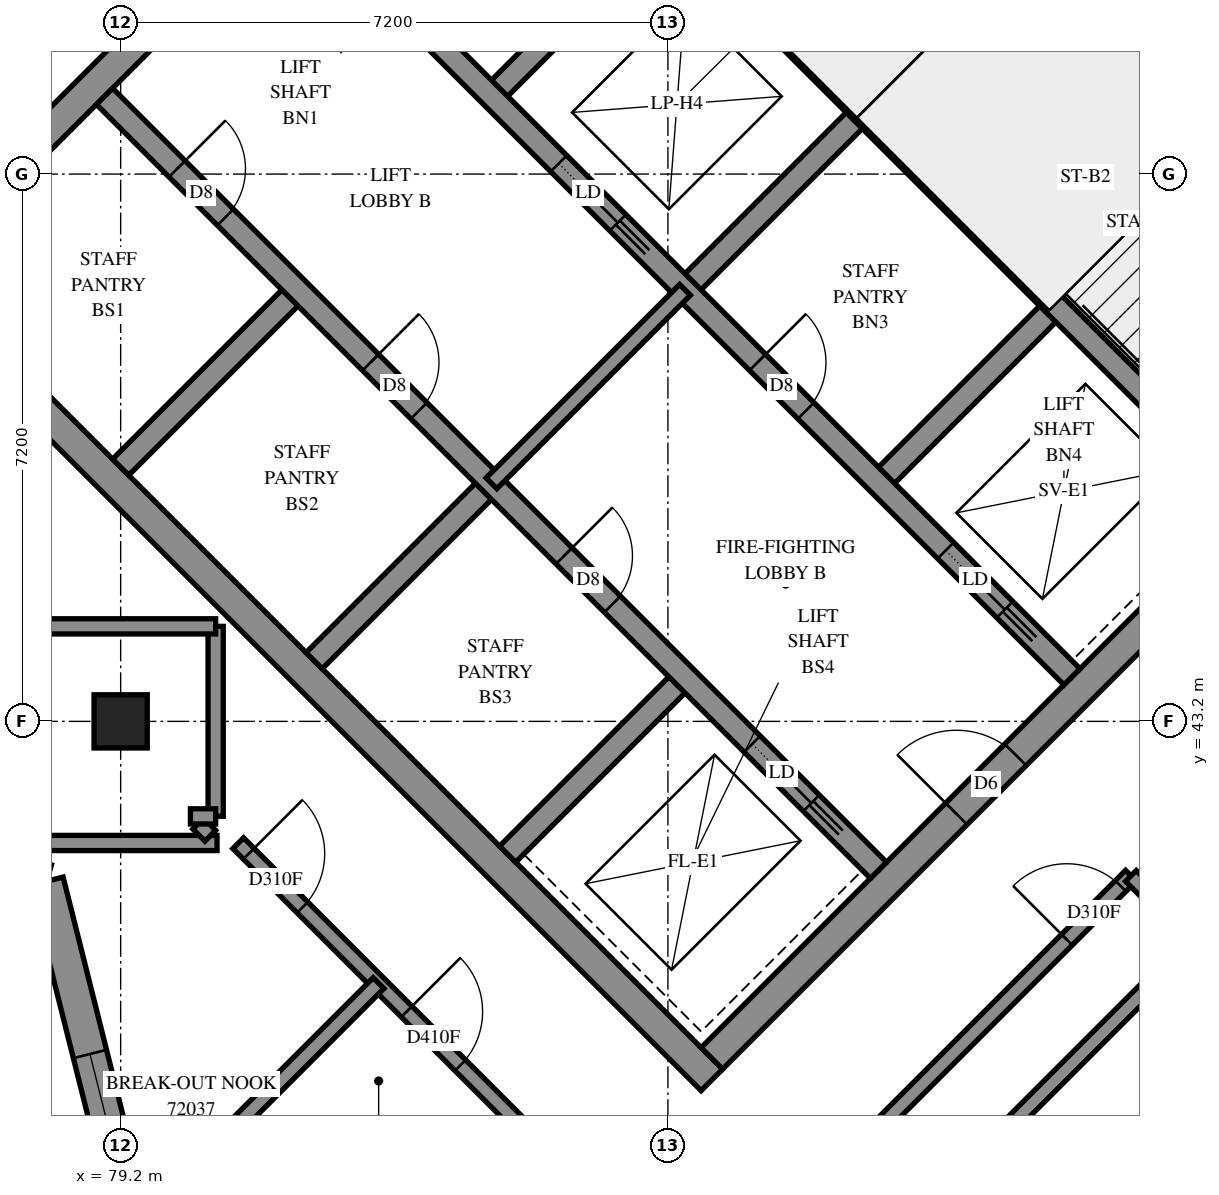
"""IFC4 building model, lengths in metres.
Left out: names, types, materials, properties, quantities, classifications, styles, units other than length and angle.
Written with IfcOpenShell. Run it as: python <this file> out.ifc"""

import sys

from ifc_helpers import new_model, si_unit, direction, frame, frame_2d, origin, origin_2d, place, context, subcontext, project, spatial, polyline, rectangle, outline, extrude, element, fill, save


model = new_model("IFC4")
c1 = context("Model", 3, precision=1e-05, world=origin(), true_north=direction((0.0, 1.0)))
c2 = subcontext(c1, "Body", "Model", "MODEL_VIEW")
j1 = project(units=[si_unit("LENGTHUNIT", "METRE"), si_unit("PLANEANGLEUNIT", "RADIAN")], contexts=[c1])
p1 = place(None, origin())
s1 = spatial("IfcSite", under=j1, at=p1, CompositionType="ELEMENT")
p2 = place(p1, origin())
s2 = spatial("IfcBuilding", under=s1, at=p2, CompositionType="ELEMENT")
p3 = place(p2, frame((0.0, 0.0, 264.2)))
s3 = spatial("IfcBuildingStorey", under=s2, at=p3, CompositionType="ELEMENT", Elevation=264.2)
p4 = place(p3, frame((79.2, 43.2, 0.0), z_axis=(0.0, 0.0, 1.0), x_axis=(1.0, 0.0, 0.0)))
e1 = element("IfcColumn", 1, at=p4, inside=s3, PredefinedType="COLUMN", context=c2, shape_type="SweptSolid", body=[
    extrude(rectangle(XDim=0.7, YDim=0.7, at=origin_2d()), origin(), (0.0, 0.0, 1.0), 3.1),
])
p5 = place(p3, frame((76.23, 49.231, -0.3), z_axis=(0.0, 0.0, 1.0), x_axis=(0.7071034917, -0.7071100706, 0.0)))
e2 = element("IfcWall", 2, at=p5, inside=s3, PredefinedType="SHEAR", context=c2, shape_type="SweptSolid", body=[
    extrude(rectangle(XDim=15.2, YDim=0.4, at=frame_2d((7.6, 0.0))), origin(), (0.0, 0.0, 1.0), 2.7),
])
p6 = place(p3, frame((86.695, 59.696, -0.3), z_axis=(0.0, 0.0, 1.0), x_axis=(0.7071100706, -0.7071034917, 0.0)))
e3 = element("IfcWall", 3, at=p6, inside=s3, PredefinedType="SHEAR", context=c2, shape_type="SweptSolid", body=[
    extrude(rectangle(XDim=15.2, YDim=0.4, at=frame_2d((7.6, 0.0))), origin(), (0.0, 0.0, 1.0), 2.7),
])
p7 = place(p6, frame((10.4, 0.0, 0.3)))
e4 = element("IfcOpeningElement", 4, at=p7, cuts=e3, PredefinedType="OPENING", context=c2, shape_type="SweptSolid", body=[
    extrude(rectangle(XDim=0.8, YDim=2.1, at=frame_2d((0.4, 1.05))), frame((0.0, 0.21, 0.0), z_axis=(0.0, -1.0, 0.0), x_axis=(1.0, 0.0, 0.0)), (0.0, 0.0, 1.0), 0.42),
])
p8 = place(p3, frame((76.513, 49.231, -0.3), z_axis=(0.0, 0.0, 1.0), x_axis=(0.7071067812, 0.7071067812, 0.0)))
e5 = element("IfcWall", 5, at=p8, inside=s3, PredefinedType="SHEAR", context=c2, shape_type="SweptSolid", body=[
    extrude(rectangle(XDim=14.4, YDim=0.4, at=frame_2d((7.2, 0.0))), origin(), (0.0, 0.0, 1.0), 2.7),
])
p9 = place(p8, frame((4.55, 0.0, 0.3)))
e6 = element("IfcOpeningElement", 6, at=p9, cuts=e5, PredefinedType="OPENING", context=c2, shape_type="SweptSolid", body=[
    extrude(rectangle(XDim=1.1, YDim=2.1, at=frame_2d((0.55, 1.05))), frame((0.0, 0.21, 0.0), z_axis=(0.0, -1.0, 0.0), x_axis=(1.0, 0.0, 0.0)), (0.0, 0.0, 1.0), 0.42),
])
p10 = place(p8, frame((11.35, 0.0, 0.3)))
e7 = element("IfcOpeningElement", 7, at=p10, cuts=e5, PredefinedType="OPENING", context=c2, shape_type="SweptSolid", body=[
    extrude(rectangle(XDim=1.1, YDim=2.1, at=frame_2d((0.55, 1.05))), frame((0.0, 0.21, 0.0), z_axis=(0.0, -1.0, 0.0), x_axis=(1.0, 0.0, 0.0)), (0.0, 0.0, 1.0), 0.42),
])
p11 = place(p3, frame((86.978, 38.766, -0.3), z_axis=(0.0, 0.0, 1.0), x_axis=(0.7071067812, 0.7071067812, 0.0)))
e8 = element("IfcWall", 8, at=p11, inside=s3, PredefinedType="SHEAR", context=c2, shape_type="SweptSolid", body=[
    extrude(rectangle(XDim=14.4, YDim=0.4, at=frame_2d((7.2, 0.0))), origin(), (0.0, 0.0, 1.0), 2.7),
])
p12 = place(p11, frame((4.55, 0.0, 0.3)))
e9 = element("IfcOpeningElement", 9, at=p12, cuts=e8, PredefinedType="OPENING", context=c2, shape_type="SweptSolid", body=[
    extrude(rectangle(XDim=1.1, YDim=2.1, at=frame_2d((0.55, 1.05))), frame((0.0, 0.21, 0.0), z_axis=(0.0, -1.0, 0.0), x_axis=(1.0, 0.0, 0.0)), (0.0, 0.0, 1.0), 0.42),
])
p13 = place(p11, frame((11.35, 0.0, 0.3)))
e10 = element("IfcOpeningElement", 10, at=p13, cuts=e8, PredefinedType="OPENING", context=c2, shape_type="SweptSolid", body=[
    extrude(rectangle(XDim=1.1, YDim=2.1, at=frame_2d((0.55, 1.05))), frame((0.0, 0.21, 0.0), z_axis=(0.0, -1.0, 0.0), x_axis=(1.0, 0.0, 0.0)), (0.0, 0.0, 1.0), 0.42),
])
for number, where, z_axis, x_axis in (
    (11, (79.2, 46.544, 0.0), (0.0, 0.0, 1.0), (0.707, 0.707, 0.0)),
    (12, (84.079, 51.423, 0.0), (0.0, 0.0, 1.0), (0.707, 0.707, 0.0)),
):
    element("IfcWall", number, at=place(p3, frame(where, z_axis=z_axis, x_axis=x_axis)), inside=s3, PredefinedType="SOLIDWALL", context=c2, shape_type="SweptSolid", body=[
        extrude(rectangle(XDim=3.3, YDim=0.3, at=frame_2d((1.65, 0.0))), origin(), (0.0, 0.0, 1.0), 3.1),
    ])
p14 = place(p3, frame((81.746, 43.999, 0.0), z_axis=(0.0, 0.0, 1.0), x_axis=(0.7071067812, 0.7071067812, 0.0)))
e13 = element("IfcWall", 13, at=p14, inside=s3, PredefinedType="SOLIDWALL", context=c2, shape_type="SweptSolid", body=[
    extrude(rectangle(XDim=3.3, YDim=0.3, at=frame_2d((1.65, 0.0))), origin(), (0.0, 0.0, 1.0), 3.1),
])
p15 = place(p3, frame((86.625, 48.878, 0.0), z_axis=(0.0, 0.0, 1.0), x_axis=(0.7071067812, 0.7071067812, 0.0)))
e14 = element("IfcWall", 14, at=p15, inside=s3, PredefinedType="SOLIDWALL", context=c2, shape_type="SweptSolid", body=[
    extrude(rectangle(XDim=3.3, YDim=0.3, at=frame_2d((1.65, 0.0))), origin(), (0.0, 0.0, 1.0), 3.1),
])
p16 = place(p3, frame((84.291, 41.453, 0.0), z_axis=(0.0, 0.0, 1.0), x_axis=(0.7071067812, 0.7071067812, 0.0)))
e15 = element("IfcWall", 15, at=p16, inside=s3, PredefinedType="SOLIDWALL", context=c2, shape_type="SweptSolid", body=[
    extrude(rectangle(XDim=3.3, YDim=0.3, at=frame_2d((1.65, 0.0))), origin(), (0.0, 0.0, 1.0), 3.1),
])
p17 = place(p3, frame((89.17, 46.332, 0.0), z_axis=(0.0, 0.0, 1.0), x_axis=(0.7071067812, 0.7071067812, 0.0)))
e16 = element("IfcWall", 16, at=p17, inside=s3, PredefinedType="SOLIDWALL", context=c2, shape_type="SweptSolid", body=[
    extrude(rectangle(XDim=3.3, YDim=0.3, at=frame_2d((1.65, 0.0))), origin(), (0.0, 0.0, 1.0), 3.1),
])
p18 = place(p3, frame((78.988, 51.423, 0.0), z_axis=(0.0, 0.0, 1.0), x_axis=(0.7071067812, -0.7071067812, 0.0)))
e17 = element("IfcWall", 17, at=p18, inside=s3, PredefinedType="SOLIDWALL", context=c2, shape_type="SweptSolid", body=[
    extrude(rectangle(XDim=14.4, YDim=0.3, at=frame_2d((7.2, 0.0))), origin(), (0.0, 0.0, 1.0), 3.1),
])
p19 = place(p18, frame((1.35, 0.0, 0.0)))
e18 = element("IfcOpeningElement", 18, at=p19, cuts=e17, PredefinedType="OPENING", context=c2, shape_type="SweptSolid", body=[
    extrude(rectangle(XDim=0.9, YDim=2.1, at=frame_2d((0.45, 1.05))), frame((0.0, 0.16, 0.0), z_axis=(0.0, -1.0, 0.0), x_axis=(1.0, 0.0, 0.0)), (0.0, 0.0, 1.0), 0.32),
])
p20 = place(p18, frame((4.95, 0.0, 0.0)))
e19 = element("IfcOpeningElement", 19, at=p20, cuts=e17, PredefinedType="OPENING", context=c2, shape_type="SweptSolid", body=[
    extrude(rectangle(XDim=0.9, YDim=2.1, at=frame_2d((0.45, 1.05))), frame((0.0, 0.16, 0.0), z_axis=(0.0, -1.0, 0.0), x_axis=(1.0, 0.0, 0.0)), (0.0, 0.0, 1.0), 0.32),
])
p21 = place(p18, frame((8.55, 0.0, 0.0)))
e20 = element("IfcOpeningElement", 20, at=p21, cuts=e17, PredefinedType="OPENING", context=c2, shape_type="SweptSolid", body=[
    extrude(rectangle(XDim=0.9, YDim=2.1, at=frame_2d((0.45, 1.05))), frame((0.0, 0.16, 0.0), z_axis=(0.0, -1.0, 0.0), x_axis=(1.0, 0.0, 0.0)), (0.0, 0.0, 1.0), 0.32),
])
p22 = place(p18, frame((12.05, 0.0, 0.0)))
e21 = element("IfcOpeningElement", 21, at=p22, cuts=e17, PredefinedType="OPENING", context=c2, shape_type="SweptSolid", body=[
    extrude(rectangle(XDim=1.1, YDim=2.1, at=frame_2d((0.55, 1.05))), frame((0.0, 0.16, 0.0), z_axis=(0.0, -1.0, 0.0), x_axis=(1.0, 0.0, 0.0)), (0.0, 0.0, 1.0), 0.32),
])
p23 = place(p3, frame((81.534, 53.969, 0.0), z_axis=(0.0, 0.0, 1.0), x_axis=(0.707103309, -0.7071102534, 0.0)))
e22 = element("IfcWall", 22, at=p23, inside=s3, PredefinedType="SOLIDWALL", context=c2, shape_type="SweptSolid", body=[
    extrude(rectangle(XDim=14.4, YDim=0.3, at=frame_2d((7.2, 0.0))), origin(), (0.0, 0.0, 1.0), 3.1),
])
p24 = place(p23, frame((8.55, 0.0, 0.0)))
e23 = element("IfcOpeningElement", 23, at=p24, cuts=e22, PredefinedType="OPENING", context=c2, shape_type="SweptSolid", body=[
    extrude(rectangle(XDim=0.9, YDim=2.1, at=frame_2d((0.45, 1.05))), frame((0.0, 0.16, 0.0), z_axis=(0.0, -1.0, 0.0), x_axis=(1.0, 0.0, 0.0)), (0.0, 0.0, 1.0), 0.32),
])
p25 = place(p23, frame((1.25, 0.0, 0.0)))
e24 = element("IfcOpeningElement", 24, at=p25, cuts=e22, PredefinedType="OPENING", context=c2, shape_type="SweptSolid", body=[
    extrude(rectangle(XDim=1.1, YDim=2.1, at=frame_2d((0.55, 1.05))), frame((0.0, 0.16, 0.0), z_axis=(0.0, -1.0, 0.0), x_axis=(1.0, 0.0, 0.0)), (0.0, 0.0, 1.0), 0.32),
])
p26 = place(p23, frame((4.85, 0.0, 0.0)))
e25 = element("IfcOpeningElement", 25, at=p26, cuts=e22, PredefinedType="OPENING", context=c2, shape_type="SweptSolid", body=[
    extrude(rectangle(XDim=1.1, YDim=2.1, at=frame_2d((0.55, 1.05))), frame((0.0, 0.16, 0.0), z_axis=(0.0, -1.0, 0.0), x_axis=(1.0, 0.0, 0.0)), (0.0, 0.0, 1.0), 0.32),
])
p27 = place(p23, frame((12.05, 0.0, 0.0)))
e26 = element("IfcOpeningElement", 26, at=p27, cuts=e22, PredefinedType="OPENING", context=c2, shape_type="SweptSolid", body=[
    extrude(rectangle(XDim=1.1, YDim=2.1, at=frame_2d((0.55, 1.05))), frame((0.0, 0.16, 0.0), z_axis=(0.0, -1.0, 0.0), x_axis=(1.0, 0.0, 0.0)), (0.0, 0.0, 1.0), 0.32),
])
for number, where, z_axis, x_axis in (
    (27, (83.867, 56.302, 0.0), (0.0, 0.0, 1.0), (0.707, -0.707, 0.0)),
    (28, (88.958, 51.211, 0.0), (0.0, 0.0, 1.0), (0.707, -0.707, 0.0)),
):
    element("IfcWall", number, at=place(p3, frame(where, z_axis=z_axis, x_axis=x_axis)), inside=s3, PredefinedType="SOLIDWALL", context=c2, shape_type="SweptSolid", body=[
        extrude(rectangle(XDim=7.2, YDim=0.3, at=frame_2d((3.6, 0.0))), origin(), (0.0, 0.0, 1.0), 3.1),
    ])
p28 = place(p3, frame((88.958, 51.211, 0.0), z_axis=(0.0, 0.0, 1.0), x_axis=(0.7071067812, 0.7071067812, 0.0)))
e29 = element("IfcWall", 29, at=p28, inside=s3, PredefinedType="SOLIDWALL", context=c2, shape_type="SweptSolid", body=[
    extrude(rectangle(XDim=4.2, YDim=0.3, at=frame_2d((2.1, 0.0))), origin(), (0.0, 0.0, 1.0), 3.1),
])
p29 = place(p3, frame((74.451, 42.229, 0.0), z_axis=(0.0, 0.0, 1.0), x_axis=(0.957789952, -0.2874689685, 0.0)))
e30 = element("IfcWall", 30, at=p29, inside=s3, PredefinedType="SOLIDWALL", context=c2, shape_type="SweptSolid", body=[
    extrude(outline(polyline([(0.049, -0.225), (3.812, -0.225), (4.068, 0.225), (-0.049, 0.225), (0.049, -0.225)])), origin(), (0.0, 0.0, 1.0), 3.1),
])
p30 = place(p3, frame((78.225, 41.097, 0.0), z_axis=(0.0, 0.0, 1.0), x_axis=(0.2436835103, -0.9698548071, 0.0)))
e31 = element("IfcWall", 31, at=p30, inside=s3, PredefinedType="SOLIDWALL", context=c2, shape_type="SweptSolid", body=[
    extrude(outline(polyline([(0.128, -0.225), (4.802, -0.225), (4.544, 0.225), (-0.128, 0.225), (0.128, -0.225)])), origin(), (0.0, 0.0, 1.0), 3.1),
])
p31 = place(p30, frame((2.344, 0.0, 0.45)))
e32 = element("IfcOpeningElement", 32, at=p31, cuts=e31, PredefinedType="OPENING", context=c2, shape_type="SweptSolid", body=[
    extrude(rectangle(XDim=1.2, YDim=2.55, at=frame_2d((0.6, 1.275))), frame((0.0, 0.235, 0.0), z_axis=(0.0, -1.0, 0.0), x_axis=(1.0, 0.0, 0.0)), (0.0, 0.0, 1.0), 0.47),
])
p32 = place(p3, frame((91.313, 53.354, 0.0), z_axis=(0.0, 0.0, 1.0), x_axis=(0.7071067812, -0.7071067812, 0.0)))
e33 = element("IfcWall", 33, at=p32, inside=s3, PredefinedType="PARTITIONING", context=c2, shape_type="SweptSolid", body=[
    extrude(rectangle(XDim=5.95, YDim=0.15, at=frame_2d((2.975, 0.0))), origin(), (0.0, 0.0, 1.0), 3.1),
])
p33 = place(p3, frame((84.079, 46.332, 0.0), z_axis=(0.0, 0.0, 1.0), x_axis=(0.7071067812, 0.7071067812, 0.0)))
e34 = element("IfcWall", 34, at=p33, inside=s3, PredefinedType="PARTITIONING", context=c2, shape_type="SweptSolid", body=[
    extrude(rectangle(XDim=3.6, YDim=0.2, at=frame_2d((1.8, 0.0))), origin(), (0.0, 0.0, 1.0), 3.1),
])
p34 = place(p3, frame((84.96, 31.941, 0.0), z_axis=(0.0, 0.0, 1.0), x_axis=(0.707102563, 0.7071109994, 0.0)))
e35 = element("IfcWall", 35, at=p34, inside=s3, PredefinedType="PARTITIONING", context=c2, shape_type="SweptSolid", body=[
    extrude(rectangle(XDim=11.853, YDim=0.2, at=frame_2d((5.927, 0.0))), origin(), (0.0, 0.0, 1.0), 3.1),
])
p35 = place(p3, frame((80.747, 41.597, 0.0), z_axis=(0.0, 0.0, 1.0), x_axis=(0.7071067812, -0.7071067812, 0.0)))
e36 = element("IfcWall", 36, at=p35, inside=s3, PredefinedType="PARTITIONING", context=c2, shape_type="SweptSolid", body=[
    extrude(rectangle(XDim=8.607, YDim=0.2, at=frame_2d((4.303, 0.0))), origin(), (0.0, 0.0, 1.0), 3.1),
])
p36 = place(p35, frame((0.195, 0.0, 0.0)))
e37 = element("IfcOpeningElement", 37, at=p36, cuts=e36, PredefinedType="OPENING", context=c2, shape_type="SweptSolid", body=[
    extrude(rectangle(XDim=1.0, YDim=2.1, at=frame_2d((0.5, 1.05))), frame((0.0, 0.11, 0.0), z_axis=(0.0, -1.0, 0.0), x_axis=(1.0, 0.0, 0.0)), (0.0, 0.0, 1.0), 0.22),
])
p37 = place(p35, frame((3.133, 0.0, 0.0)))
e38 = element("IfcOpeningElement", 38, at=p37, cuts=e36, PredefinedType="OPENING", context=c2, shape_type="SweptSolid", body=[
    extrude(rectangle(XDim=1.0, YDim=2.1, at=frame_2d((0.5, 1.05))), frame((0.0, 0.11, 0.0), z_axis=(0.0, -1.0, 0.0), x_axis=(1.0, 0.0, 0.0)), (0.0, 0.0, 1.0), 0.22),
])
p38 = place(p3, frame((86.836, 35.514, 0.0), z_axis=(0.0, 0.0, 1.0), x_axis=(0.7071067812, 0.7071067812, 0.0)))
e39 = element("IfcWall", 39, at=p38, inside=s3, PredefinedType="PARTITIONING", context=c2, shape_type="SweptSolid", body=[
    extrude(rectangle(XDim=7.999, YDim=0.2, at=frame_2d((3.999, 0.0))), origin(), (0.0, 0.0, 1.0), 3.1),
])
p39 = place(p38, frame((6.807, 0.0, 0.0)))
e40 = element("IfcOpeningElement", 40, at=p39, cuts=e39, PredefinedType="OPENING", context=c2, shape_type="SweptSolid", body=[
    extrude(rectangle(XDim=1.0, YDim=2.1, at=frame_2d((0.5, 1.05))), frame((0.0, 0.11, 0.0), z_axis=(0.0, -1.0, 0.0), x_axis=(1.0, 0.0, 0.0)), (0.0, 0.0, 1.0), 0.22),
])
p40 = place(p3, frame((92.491, 41.167, 0.0), z_axis=(0.0, 0.0, 1.0), x_axis=(0.7071067812, -0.7071067812, 0.0)))
e41 = element("IfcWall", 41, at=p40, inside=s3, PredefinedType="PARTITIONING", context=c2, shape_type="SweptSolid", body=[
    extrude(rectangle(XDim=4.8, YDim=0.2, at=frame_2d((2.4, 0.0))), origin(), (0.0, 0.0, 1.0), 3.1),
])
p41 = place(p40, frame((1.725, 0.0, 0.0)))
e42 = element("IfcOpeningElement", 42, at=p41, cuts=e41, PredefinedType="OPENING", context=c2, shape_type="SweptSolid", body=[
    extrude(rectangle(XDim=1.0, YDim=2.1, at=frame_2d((0.5, 1.05))), frame((0.0, 0.11, 0.0), z_axis=(0.0, -1.0, 0.0), x_axis=(1.0, 0.0, 0.0)), (0.0, 0.0, 1.0), 0.22),
])
p42 = place(p3, frame((79.574, 36.738, 0.0), z_axis=(0.0, 0.0, 1.0), x_axis=(0.7071067812, 0.7071067812, 0.0)))
e43 = element("IfcWall", 43, at=p42, inside=s3, PredefinedType="PARTITIONING", context=c2, shape_type="SweptSolid", body=[
    extrude(rectangle(XDim=4.269, YDim=0.2, at=frame_2d((2.135, 0.0))), origin(), (0.0, 0.0, 1.0), 3.1),
])
p43 = place(p3, frame((77.381, 41.6, 0.0), z_axis=(0.0, 0.0, 1.0), x_axis=(1.0, 0.0, 0.0)))
e44 = element("IfcWall", 44, at=p43, inside=s3, PredefinedType="PARTITIONING", context=c2, shape_type="SweptSolid", body=[
    extrude(rectangle(XDim=3.087, YDim=0.2, at=frame_2d((1.543, 0.0))), origin(), (0.0, 0.0, 1.0), 3.1),
])
for number, where, z_axis, x_axis in (
    (45, (80.45, 41.952, 0.0), (0.0, 0.0, 1.0), (0.0, 1.0, 0.0)),
    (46, (77.952, 44.45, 0.0), (0.0, 0.0, 1.0), (1.0, 0.0, 0.0)),
):
    element("IfcWall", number, at=place(p3, frame(where, z_axis=z_axis, x_axis=x_axis)), inside=s3, PredefinedType="PARTITIONING", context=c2, shape_type="SweptSolid", body=[
        extrude(rectangle(XDim=2.498, YDim=0.2, at=frame_2d((1.249, 0.0))), origin(), (0.0, 0.0, 1.0), 3.1),
    ])
p44 = place(p3, frame((80.221, 41.855, 0.0), z_axis=(0.0, 0.0, 1.0), x_axis=(0.7068844555, -0.707329037, 0.0)))
e47 = element("IfcWall", 47, at=p44, inside=s3, PredefinedType="PARTITIONING", context=c2, shape_type="SweptSolid", body=[
    extrude(rectangle(XDim=0.225, YDim=0.2, at=frame_2d((0.112, 0.0))), origin(), (0.0, 0.0, 1.0), 3.1),
])
p45 = place(p3, frame((80.118, 41.95, 0.0), z_axis=(0.0, 0.0, 1.0), x_axis=(1.0, 0.0, 0.0)))
e48 = element("IfcWall", 48, at=p45, inside=s3, PredefinedType="PARTITIONING", context=c2, shape_type="SweptSolid", body=[
    extrude(rectangle(XDim=0.332, YDim=0.2, at=frame_2d((0.166, 0.0))), origin(), (0.0, 0.0, 1.0), 3.1),
])
p46 = place(p31, origin())
e49 = element("IfcWindow", 49, at=p46, inside=s3, PartitioningType="SINGLE_PANEL", PredefinedType="WINDOW", context=c2, shape_type="SweptSolid", body=[
    extrude(rectangle(XDim=1.2, YDim=2.55, at=frame_2d((0.6, 1.275))), frame((0.0, 0.205, 0.0), z_axis=(0.0, -1.0, 0.0), x_axis=(1.0, 0.0, 0.0)), (0.0, 0.0, 1.0), 0.06),
])
fill(e32, e49)
p47 = place(p12, origin())
e50 = element("IfcDoor", 50, at=p47, inside=s3, OperationType="DOUBLE_DOOR_SINGLE_SWING", PredefinedType="DOOR", context=c2, shape_type="SweptSolid", body=[
    extrude(rectangle(XDim=1.1, YDim=2.1, at=frame_2d((0.55, 1.05))), frame((0.0, 0.025, 0.0), z_axis=(0.0, -1.0, 0.0), x_axis=(1.0, 0.0, 0.0)), (0.0, 0.0, 1.0), 0.05),
])
fill(e9, e50)
p48 = place(p19, origin())
e51 = element("IfcDoor", 51, at=p48, inside=s3, OperationType="SINGLE_SWING_LEFT", PredefinedType="DOOR", context=c2, shape_type="SweptSolid", body=[
    extrude(rectangle(XDim=0.9, YDim=2.1, at=frame_2d((0.45, 1.05))), frame((0.0, 0.025, 0.0), z_axis=(0.0, -1.0, 0.0), x_axis=(1.0, 0.0, 0.0)), (0.0, 0.0, 1.0), 0.05),
])
fill(e18, e51)
p49 = place(p20, origin())
e52 = element("IfcDoor", 52, at=p49, inside=s3, OperationType="SINGLE_SWING_LEFT", PredefinedType="DOOR", context=c2, shape_type="SweptSolid", body=[
    extrude(rectangle(XDim=0.9, YDim=2.1, at=frame_2d((0.45, 1.05))), frame((0.0, 0.025, 0.0), z_axis=(0.0, -1.0, 0.0), x_axis=(1.0, 0.0, 0.0)), (0.0, 0.0, 1.0), 0.05),
])
fill(e19, e52)
p50 = place(p21, origin())
e53 = element("IfcDoor", 53, at=p50, inside=s3, OperationType="SINGLE_SWING_LEFT", PredefinedType="DOOR", context=c2, shape_type="SweptSolid", body=[
    extrude(rectangle(XDim=0.9, YDim=2.1, at=frame_2d((0.45, 1.05))), frame((0.0, 0.025, 0.0), z_axis=(0.0, -1.0, 0.0), x_axis=(1.0, 0.0, 0.0)), (0.0, 0.0, 1.0), 0.05),
])
fill(e20, e53)
p51 = place(p24, origin())
e54 = element("IfcDoor", 54, at=p51, inside=s3, OperationType="SINGLE_SWING_LEFT", PredefinedType="DOOR", context=c2, shape_type="SweptSolid", body=[
    extrude(rectangle(XDim=0.9, YDim=2.1, at=frame_2d((0.45, 1.05))), frame((0.0, 0.025, 0.0), z_axis=(0.0, -1.0, 0.0), x_axis=(1.0, 0.0, 0.0)), (0.0, 0.0, 1.0), 0.05),
])
fill(e23, e54)
p52 = place(p22, origin())
e55 = element("IfcDoor", 55, at=p52, inside=s3, OperationType="SLIDING_TO_RIGHT", PredefinedType="DOOR", context=c2, shape_type="SweptSolid", body=[
    extrude(rectangle(XDim=1.1, YDim=2.1, at=frame_2d((0.55, 1.05))), frame((0.0, 0.025, 0.0), z_axis=(0.0, -1.0, 0.0), x_axis=(1.0, 0.0, 0.0)), (0.0, 0.0, 1.0), 0.05),
])
fill(e21, e55)
p53 = place(p26, origin())
e56 = element("IfcDoor", 56, at=p53, inside=s3, OperationType="SLIDING_TO_RIGHT", PredefinedType="DOOR", context=c2, shape_type="SweptSolid", body=[
    extrude(rectangle(XDim=1.1, YDim=2.1, at=frame_2d((0.55, 1.05))), frame((0.0, 0.025, 0.0), z_axis=(0.0, -1.0, 0.0), x_axis=(1.0, 0.0, 0.0)), (0.0, 0.0, 1.0), 0.05),
])
fill(e25, e56)
p54 = place(p27, origin())
e57 = element("IfcDoor", 57, at=p54, inside=s3, OperationType="SLIDING_TO_RIGHT", PredefinedType="DOOR", context=c2, shape_type="SweptSolid", body=[
    extrude(rectangle(XDim=1.1, YDim=2.1, at=frame_2d((0.55, 1.05))), frame((0.0, 0.025, 0.0), z_axis=(0.0, -1.0, 0.0), x_axis=(1.0, 0.0, 0.0)), (0.0, 0.0, 1.0), 0.05),
])
fill(e26, e57)
p55 = place(p36, origin())
e58 = element("IfcDoor", 58, at=p55, inside=s3, OperationType="SINGLE_SWING_LEFT", PredefinedType="DOOR", context=c2, shape_type="SweptSolid", body=[
    extrude(rectangle(XDim=1.0, YDim=2.1, at=frame_2d((0.5, 1.05))), frame((0.0, 0.025, 0.0), z_axis=(0.0, -1.0, 0.0), x_axis=(1.0, 0.0, 0.0)), (0.0, 0.0, 1.0), 0.05),
])
fill(e37, e58)
p56 = place(p37, origin())
e59 = element("IfcDoor", 59, at=p56, inside=s3, OperationType="SINGLE_SWING_LEFT", PredefinedType="DOOR", context=c2, shape_type="SweptSolid", body=[
    extrude(rectangle(XDim=1.0, YDim=2.1, at=frame_2d((0.5, 1.05))), frame((0.0, 0.025, 0.0), z_axis=(0.0, -1.0, 0.0), x_axis=(1.0, 0.0, 0.0)), (0.0, 0.0, 1.0), 0.05),
])
fill(e38, e59)
p57 = place(p39, origin())
e60 = element("IfcDoor", 60, at=p57, inside=s3, OperationType="SINGLE_SWING_RIGHT", PredefinedType="DOOR", context=c2, shape_type="SweptSolid", body=[
    extrude(rectangle(XDim=1.0, YDim=2.1, at=frame_2d((0.5, 1.05))), frame((0.0, 0.025, 0.0), z_axis=(0.0, -1.0, 0.0), x_axis=(1.0, 0.0, 0.0)), (0.0, 0.0, 1.0), 0.05),
])
fill(e40, e60)
save(model, sys.argv[1])
